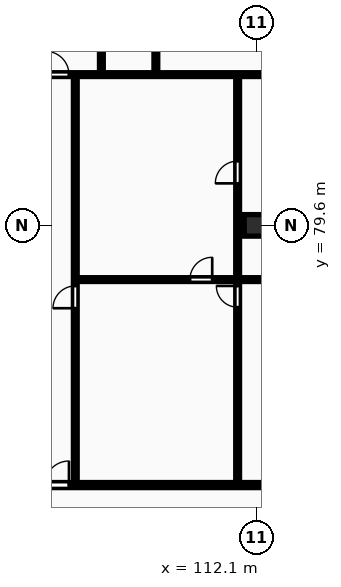
"""IFC4 building model, lengths in metres.
Left out: names, types, materials, properties, quantities, classifications, styles, units other than length and angle.
Written with IfcOpenShell. Run it as: python <this file> out.ifc"""

import sys

from ifc_helpers import new_model, si_unit, direction, frame, frame_2d, origin, origin_2d, place, context, subcontext, project, spatial, rectangle, extrude, element, fill, save


model = new_model("IFC4")
c1 = context("Model", 3, precision=1e-05, world=origin(), true_north=direction((0.0, 1.0)))
c2 = subcontext(c1, "Body", "Model", "MODEL_VIEW")
j1 = project(units=[si_unit("LENGTHUNIT", "METRE"), si_unit("PLANEANGLEUNIT", "RADIAN")], contexts=[c1])
p1 = place(None, origin())
s1 = spatial("IfcSite", under=j1, at=p1, CompositionType="ELEMENT")
p2 = place(p1, origin())
s2 = spatial("IfcBuilding", under=s1, at=p2, CompositionType="ELEMENT")
p3 = place(p2, frame((0.0, 0.0, 87.3)))
s3 = spatial("IfcBuildingStorey", under=s2, at=p3, CompositionType="ELEMENT", Elevation=87.3)
p4 = place(p3, frame((112.1, 79.6, 0.0), z_axis=(0.0, 0.0, 1.0), x_axis=(1.0, 0.0, 0.0)))
e1 = element("IfcColumn", 1, at=p4, inside=s3, PredefinedType="COLUMN", context=c2, shape_type="SweptSolid", body=[
    extrude(rectangle(XDim=0.95, YDim=0.85, at=origin_2d()), origin(), (0.0, 0.0, 1.0), 3.25),
])
p5 = place(p3, frame((111.365, 69.41, 0.0), z_axis=(0.0, 0.0, 1.0), x_axis=(0.0, 1.0, 0.0)))
e2 = element("IfcWall", 2, at=p5, inside=s3, PredefinedType="PARTITIONING", context=c2, shape_type="SweptSolid", body=[
    extrude(rectangle(XDim=16.1, YDim=0.15, at=frame_2d((8.05, 0.0))), origin(), (0.0, 0.0, 1.0), 2.97),
])
p6 = place(p5, frame((6.96, 0.0, 0.0)))
e3 = element("IfcOpeningElement", 3, at=p6, cuts=e2, PredefinedType="OPENING", context=c2, shape_type="SweptSolid", body=[
    extrude(rectangle(XDim=0.84, YDim=2.04, at=frame_2d((0.42, 1.02))), frame((0.0, 0.085, 0.0), z_axis=(0.0, -1.0, 0.0), x_axis=(1.0, 0.0, 0.0)), (0.0, 0.0, 1.0), 0.17),
])
p7 = place(p5, frame((11.848, 0.0, 0.0)))
e4 = element("IfcOpeningElement", 4, at=p7, cuts=e2, PredefinedType="OPENING", context=c2, shape_type="SweptSolid", body=[
    extrude(rectangle(XDim=0.88, YDim=2.06, at=frame_2d((0.44, 1.03))), frame((0.0, 0.085, 0.0), z_axis=(0.0, -1.0, 0.0), x_axis=(1.0, 0.0, 0.0)), (0.0, 0.0, 1.0), 0.17),
])
p8 = place(p3, frame((105.017, 77.46, 0.0), z_axis=(0.0, 0.0, 1.0), x_axis=(1.0, 0.0, 0.0)))
e5 = element("IfcWall", 5, at=p8, inside=s3, PredefinedType="PARTITIONING", context=c2, shape_type="SweptSolid", body=[
    extrude(rectangle(XDim=12.936, YDim=0.15, at=frame_2d((6.468, 0.0))), origin(), (0.0, 0.0, 1.0), 2.97),
])
p9 = place(p8, frame((4.464, 0.0, 0.0)))
e6 = element("IfcOpeningElement", 6, at=p9, cuts=e5, PredefinedType="OPENING", context=c2, shape_type="SweptSolid", body=[
    extrude(rectangle(XDim=0.88, YDim=2.06, at=frame_2d((0.44, 1.03))), frame((0.0, 0.085, 0.0), z_axis=(0.0, -1.0, 0.0), x_axis=(1.0, 0.0, 0.0)), (0.0, 0.0, 1.0), 0.17),
])
p10 = place(p3, frame((104.957, 69.41, 0.0), z_axis=(0.0, 0.0, 1.0), x_axis=(0.0, 1.0, 0.0)))
e7 = element("IfcWall", 7, at=p10, inside=s3, PredefinedType="PARTITIONING", context=c2, shape_type="SweptSolid", body=[
    extrude(rectangle(XDim=16.1, YDim=0.15, at=frame_2d((8.05, 0.0))), origin(), (0.0, 0.0, 1.0), 2.97),
])
p11 = place(p10, frame((6.92, 0.0, 0.0)))
e8 = element("IfcOpeningElement", 8, at=p11, cuts=e7, PredefinedType="OPENING", context=c2, shape_type="SweptSolid", body=[
    extrude(rectangle(XDim=0.88, YDim=2.06, at=frame_2d((0.44, 1.03))), frame((0.0, 0.085, 0.0), z_axis=(0.0, -1.0, 0.0), x_axis=(1.0, 0.0, 0.0)), (0.0, 0.0, 1.0), 0.17),
])
p12 = place(p3, frame((108.137, 85.59, 0.0), z_axis=(0.0, 0.0, 1.0), x_axis=(0.0, 1.0, 0.0)))
e9 = element("IfcWall", 9, at=p12, inside=s3, PredefinedType="PARTITIONING", context=c2, shape_type="SweptSolid", body=[
    extrude(rectangle(XDim=2.58, YDim=0.15, at=frame_2d((1.29, 0.0))), origin(), (0.0, 0.0, 1.0), 2.97),
])
p13 = place(p3, frame((105.987, 85.59, 0.0), z_axis=(0.0, 0.0, 1.0), x_axis=(0.0, 1.0, 0.0)))
e10 = element("IfcWall", 10, at=p13, inside=s3, PredefinedType="PARTITIONING", context=c2, shape_type="SweptSolid", body=[
    extrude(rectangle(XDim=10.31, YDim=0.15, at=frame_2d((5.155, 0.0))), origin(), (0.0, 0.0, 1.0), 2.97),
])
p14 = place(p13, frame((3.82, 0.0, 0.0)))
e11 = element("IfcOpeningElement", 11, at=p14, cuts=e10, PredefinedType="OPENING", context=c2, shape_type="SweptSolid", body=[
    extrude(rectangle(XDim=0.92, YDim=2.08, at=frame_2d((0.46, 1.04))), frame((0.0, 0.085, 0.0), z_axis=(0.0, -1.0, 0.0), x_axis=(1.0, 0.0, 0.0)), (0.0, 0.0, 1.0), 0.17),
])
p15 = place(p3, frame((101.067, 85.55, 0.0), z_axis=(0.0, 0.0, 1.0), x_axis=(1.0, 0.0, 0.0)))
e12 = element("IfcWall", 12, at=p15, inside=s3, PredefinedType="PARTITIONING", context=c2, shape_type="SweptSolid", body=[
    extrude(rectangle(XDim=16.886, YDim=0.15, at=frame_2d((8.443, 0.0))), origin(), (0.0, 0.0, 1.0), 2.97),
])
p16 = place(p15, frame((2.72, 0.0, 0.0)))
e13 = element("IfcOpeningElement", 13, at=p16, cuts=e12, PredefinedType="OPENING", context=c2, shape_type="SweptSolid", body=[
    extrude(rectangle(XDim=0.92, YDim=2.08, at=frame_2d((0.46, 1.04))), frame((0.0, 0.085, 0.0), z_axis=(0.0, -1.0, 0.0), x_axis=(1.0, 0.0, 0.0)), (0.0, 0.0, 1.0), 0.17),
])
p17 = place(p3, frame((57.6, 69.35, 0.0), z_axis=(0.0, 0.0, 1.0), x_axis=(1.0, 0.0, 0.0)))
e14 = element("IfcWall", 14, at=p17, inside=s3, PredefinedType="PARTITIONING", context=c2, shape_type="SweptSolid", body=[
    extrude(rectangle(XDim=73.0, YDim=0.2, at=frame_2d((36.5, 0.0))), origin(), (0.0, 0.0, 1.0), 2.97),
])
p18 = place(p17, frame((0.37, 0.0, 0.0)))
e15 = element("IfcOpeningElement", 15, at=p18, cuts=e14, PredefinedType="OPENING", context=c2, shape_type="SweptSolid", body=[
    extrude(rectangle(XDim=0.95, YDim=2.15, at=frame_2d((0.475, 1.075))), frame((0.0, 0.11, 0.0), z_axis=(0.0, -1.0, 0.0), x_axis=(1.0, 0.0, 0.0)), (0.0, 0.0, 1.0), 0.22),
])
p19 = place(p17, frame((20.421, 0.0, 0.0)))
e16 = element("IfcOpeningElement", 16, at=p19, cuts=e14, PredefinedType="OPENING", context=c2, shape_type="SweptSolid", body=[
    extrude(rectangle(XDim=1.22, YDim=2.18, at=frame_2d((0.61, 1.09))), frame((0.0, 0.11, 0.0), z_axis=(0.0, -1.0, 0.0), x_axis=(1.0, 0.0, 0.0)), (0.0, 0.0, 1.0), 0.22),
])
p20 = place(p17, frame((32.729, 0.0, 0.0)))
e17 = element("IfcOpeningElement", 17, at=p20, cuts=e14, PredefinedType="OPENING", context=c2, shape_type="SweptSolid", body=[
    extrude(rectangle(XDim=0.95, YDim=2.15, at=frame_2d((0.475, 1.075))), frame((0.0, 0.11, 0.0), z_axis=(0.0, -1.0, 0.0), x_axis=(1.0, 0.0, 0.0)), (0.0, 0.0, 1.0), 0.22),
])
p21 = place(p17, frame((46.157, 0.0, 0.0)))
e18 = element("IfcOpeningElement", 18, at=p21, cuts=e14, PredefinedType="OPENING", context=c2, shape_type="SweptSolid", body=[
    extrude(rectangle(XDim=0.95, YDim=2.15, at=frame_2d((0.475, 1.075))), frame((0.0, 0.11, 0.0), z_axis=(0.0, -1.0, 0.0), x_axis=(1.0, 0.0, 0.0)), (0.0, 0.0, 1.0), 0.22),
])
p22 = place(p17, frame((60.803, 0.0, 0.0)))
e19 = element("IfcOpeningElement", 19, at=p22, cuts=e14, PredefinedType="OPENING", context=c2, shape_type="SweptSolid", body=[
    extrude(rectangle(XDim=0.95, YDim=2.15, at=frame_2d((0.475, 1.075))), frame((0.0, 0.11, 0.0), z_axis=(0.0, -1.0, 0.0), x_axis=(1.0, 0.0, 0.0)), (0.0, 0.0, 1.0), 0.22),
])
p23 = place(p6, origin())
e20 = element("IfcDoor", 20, at=p23, inside=s3, OperationType="SINGLE_SWING_RIGHT", PredefinedType="DOOR", context=c2, shape_type="SweptSolid", body=[
    extrude(rectangle(XDim=0.84, YDim=2.04, at=frame_2d((0.42, 1.02))), frame((0.0, 0.025, 0.0), z_axis=(0.0, -1.0, 0.0), x_axis=(1.0, 0.0, 0.0)), (0.0, 0.0, 1.0), 0.05),
])
fill(e3, e20)
p24 = place(p7, origin())
e21 = element("IfcDoor", 21, at=p24, inside=s3, OperationType="SINGLE_SWING_LEFT", PredefinedType="DOOR", context=c2, shape_type="SweptSolid", body=[
    extrude(rectangle(XDim=0.88, YDim=2.06, at=frame_2d((0.44, 1.03))), frame((0.0, 0.025, 0.0), z_axis=(0.0, -1.0, 0.0), x_axis=(1.0, 0.0, 0.0)), (0.0, 0.0, 1.0), 0.05),
])
fill(e4, e21)
p25 = place(p9, origin())
e22 = element("IfcDoor", 22, at=p25, inside=s3, OperationType="SINGLE_SWING_RIGHT", PredefinedType="DOOR", context=c2, shape_type="SweptSolid", body=[
    extrude(rectangle(XDim=0.88, YDim=2.06, at=frame_2d((0.44, 1.03))), frame((0.0, 0.025, 0.0), z_axis=(0.0, -1.0, 0.0), x_axis=(1.0, 0.0, 0.0)), (0.0, 0.0, 1.0), 0.05),
])
fill(e6, e22)
p26 = place(p11, origin())
e23 = element("IfcDoor", 23, at=p26, inside=s3, OperationType="SINGLE_SWING_LEFT", PredefinedType="DOOR", context=c2, shape_type="SweptSolid", body=[
    extrude(rectangle(XDim=0.88, YDim=2.06, at=frame_2d((0.44, 1.03))), frame((0.0, 0.025, 0.0), z_axis=(0.0, -1.0, 0.0), x_axis=(1.0, 0.0, 0.0)), (0.0, 0.0, 1.0), 0.05),
])
fill(e8, e23)
p27 = place(p16, origin())
e24 = element("IfcDoor", 24, at=p27, inside=s3, OperationType="SINGLE_SWING_LEFT", PredefinedType="DOOR", context=c2, shape_type="SweptSolid", body=[
    extrude(rectangle(XDim=0.92, YDim=2.08, at=frame_2d((0.46, 1.04))), frame((0.0, 0.025, 0.0), z_axis=(0.0, -1.0, 0.0), x_axis=(1.0, 0.0, 0.0)), (0.0, 0.0, 1.0), 0.05),
])
fill(e13, e24)
p28 = place(p21, origin())
e25 = element("IfcDoor", 25, at=p28, inside=s3, OperationType="SINGLE_SWING_RIGHT", PredefinedType="DOOR", context=c2, shape_type="SweptSolid", body=[
    extrude(rectangle(XDim=0.95, YDim=2.15, at=frame_2d((0.475, 1.075))), frame((0.0, 0.025, 0.0), z_axis=(0.0, -1.0, 0.0), x_axis=(1.0, 0.0, 0.0)), (0.0, 0.0, 1.0), 0.05),
])
fill(e18, e25)
save(model, sys.argv[1])
